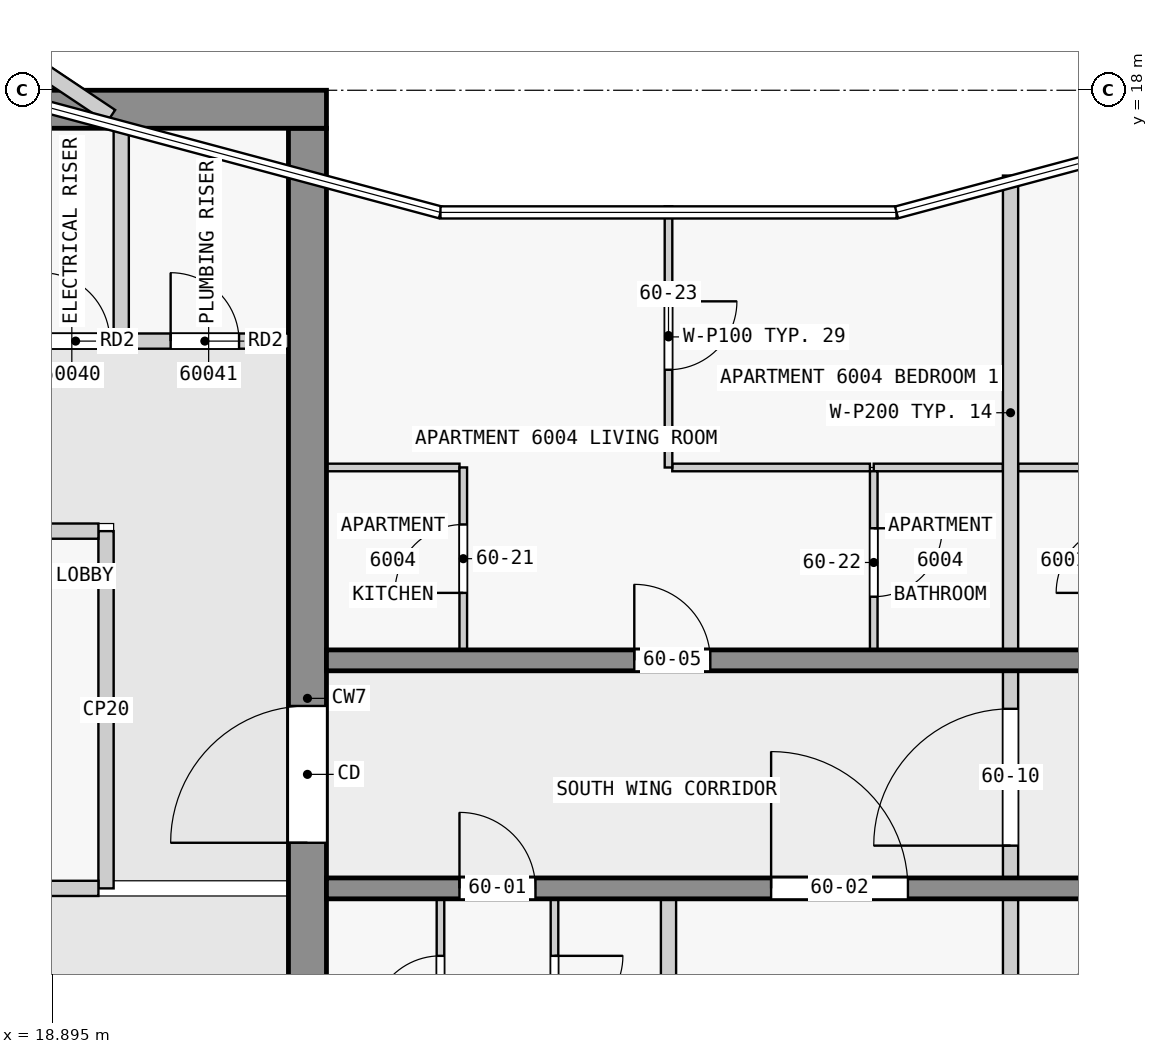
"""IFC4 building model, lengths in metres.
Left out: names, types, materials, properties, quantities, classifications, styles, units other than length and angle.
Written with IfcOpenShell. Run it as: python <this file> out.ifc"""

import sys

from ifc_helpers import new_model, si_unit, direction, frame, frame_2d, origin, place, context, subcontext, project, spatial, rectangle, extrude, element, fill, save


model = new_model("IFC4")
c1 = context("Model", 3, precision=1e-05, world=origin(), true_north=direction((0.0, 1.0)))
c2 = subcontext(c1, "Body", "Model", "MODEL_VIEW")
j1 = project(units=[si_unit("LENGTHUNIT", "METRE"), si_unit("PLANEANGLEUNIT", "RADIAN")], contexts=[c1])
p1 = place(None, origin())
s1 = spatial("IfcSite", under=j1, at=p1, CompositionType="ELEMENT")
p2 = place(p1, origin())
s2 = spatial("IfcBuilding", under=s1, at=p2, CompositionType="ELEMENT")
p3 = place(p2, frame((0.0, 0.0, 229.4)))
s3 = spatial("IfcBuildingStorey", under=s2, at=p3, CompositionType="ELEMENT", Elevation=229.4)
p4 = place(p3, frame((1.8, 17.75, 0.0), z_axis=(0.0, 0.0, 1.0), x_axis=(1.0, 0.0, 0.0)))
e1 = element("IfcWall", 1, at=p4, inside=s3, PredefinedType="SHEAR", context=c2, shape_type="SweptSolid", body=[
    extrude(rectangle(XDim=20.7, YDim=0.5, at=frame_2d((10.35, 0.0))), origin(), (0.0, 0.0, 1.0), 3.25),
])
p5 = place(p3, frame((22.25, 2.5, 0.0), z_axis=(0.0, 0.0, 1.0), x_axis=(0.0, 1.0, 0.0)))
e2 = element("IfcWall", 2, at=p5, inside=s3, PredefinedType="SHEAR", context=c2, shape_type="SweptSolid", body=[
    extrude(rectangle(XDim=15.0, YDim=0.5, at=frame_2d((7.5, 0.0))), origin(), (0.0, 0.0, 1.0), 3.25),
])
p6 = place(p5, frame((5.6, 0.0, 0.0)))
e3 = element("IfcOpeningElement", 3, at=p6, cuts=e2, PredefinedType="OPENING", context=c2, shape_type="SweptSolid", body=[
    extrude(rectangle(XDim=1.8, YDim=2.1, at=frame_2d((0.9, 1.05))), frame((0.0, 0.26, 0.0), z_axis=(0.0, -1.0, 0.0), x_axis=(1.0, 0.0, 0.0)), (0.0, 0.0, 1.0), 0.52),
])
p7 = place(p3, frame((22.5, 7.5, 0.0), z_axis=(0.0, 0.0, 1.0), x_axis=(1.0, 0.0, 0.0)))
e4 = element("IfcWall", 4, at=p7, inside=s3, PredefinedType="SHEAR", context=c2, shape_type="SweptSolid", body=[
    extrude(rectangle(XDim=22.5, YDim=0.275, at=frame_2d((11.25, 0.0))), origin(), (0.0, 0.0, 1.0), 3.25),
])
p8 = place(p7, frame((1.75, 0.0, 0.0)))
e5 = element("IfcOpeningElement", 5, at=p8, cuts=e4, PredefinedType="OPENING", context=c2, shape_type="SweptSolid", body=[
    extrude(rectangle(XDim=1.0, YDim=2.1, at=frame_2d((0.5, 1.05))), frame((0.0, 0.147, 0.0), z_axis=(0.0, -1.0, 0.0), x_axis=(1.0, 0.0, 0.0)), (0.0, 0.0, 1.0), 0.295),
])
p9 = place(p7, frame((5.85, 0.0, 0.0)))
e6 = element("IfcOpeningElement", 6, at=p9, cuts=e4, PredefinedType="OPENING", context=c2, shape_type="SweptSolid", body=[
    extrude(rectangle(XDim=1.8, YDim=2.1, at=frame_2d((0.9, 1.05))), frame((0.0, 0.147, 0.0), z_axis=(0.0, -1.0, 0.0), x_axis=(1.0, 0.0, 0.0)), (0.0, 0.0, 1.0), 0.295),
])
p10 = place(p7, frame((10.75, 0.0, 0.0)))
e7 = element("IfcOpeningElement", 7, at=p10, cuts=e4, PredefinedType="OPENING", context=c2, shape_type="SweptSolid", body=[
    extrude(rectangle(XDim=1.0, YDim=2.1, at=frame_2d((0.5, 1.05))), frame((0.0, 0.147, 0.0), z_axis=(0.0, -1.0, 0.0), x_axis=(1.0, 0.0, 0.0)), (0.0, 0.0, 1.0), 0.295),
])
p11 = place(p7, frame((16.85, 0.0, 0.0)))
e8 = element("IfcOpeningElement", 8, at=p11, cuts=e4, PredefinedType="OPENING", context=c2, shape_type="SweptSolid", body=[
    extrude(rectangle(XDim=1.0, YDim=2.1, at=frame_2d((0.5, 1.05))), frame((0.0, 0.147, 0.0), z_axis=(0.0, -1.0, 0.0), x_axis=(1.0, 0.0, 0.0)), (0.0, 0.0, 1.0), 0.295),
])
p12 = place(p3, frame((22.5, 10.5, 0.0), z_axis=(0.0, 0.0, 1.0), x_axis=(1.0, 0.0, 0.0)))
e9 = element("IfcWall", 9, at=p12, inside=s3, PredefinedType="SHEAR", context=c2, shape_type="SweptSolid", body=[
    extrude(rectangle(XDim=22.5, YDim=0.275, at=frame_2d((11.25, 0.0))), origin(), (0.0, 0.0, 1.0), 3.25),
])
p13 = place(p12, frame((4.05, 0.0, 0.0)))
e10 = element("IfcOpeningElement", 10, at=p13, cuts=e9, PredefinedType="OPENING", context=c2, shape_type="SweptSolid", body=[
    extrude(rectangle(XDim=1.0, YDim=2.1, at=frame_2d((0.5, 1.05))), frame((0.0, 0.147, 0.0), z_axis=(0.0, -1.0, 0.0), x_axis=(1.0, 0.0, 0.0)), (0.0, 0.0, 1.0), 0.295),
])
p14 = place(p12, frame((10.75, 0.0, 0.0)))
e11 = element("IfcOpeningElement", 11, at=p14, cuts=e9, PredefinedType="OPENING", context=c2, shape_type="SweptSolid", body=[
    extrude(rectangle(XDim=1.0, YDim=2.1, at=frame_2d((0.5, 1.05))), frame((0.0, 0.147, 0.0), z_axis=(0.0, -1.0, 0.0), x_axis=(1.0, 0.0, 0.0)), (0.0, 0.0, 1.0), 0.295),
])
p15 = place(p12, frame((15.25, 0.0, 0.0)))
e12 = element("IfcOpeningElement", 12, at=p15, cuts=e9, PredefinedType="OPENING", context=c2, shape_type="SweptSolid", body=[
    extrude(rectangle(XDim=1.0, YDim=2.1, at=frame_2d((0.5, 1.05))), frame((0.0, 0.147, 0.0), z_axis=(0.0, -1.0, 0.0), x_axis=(1.0, 0.0, 0.0)), (0.0, 0.0, 1.0), 0.295),
])
p16 = place(p12, frame((18.75, 0.0, 0.0)))
e13 = element("IfcOpeningElement", 13, at=p16, cuts=e9, PredefinedType="OPENING", context=c2, shape_type="SweptSolid", body=[
    extrude(rectangle(XDim=0.9, YDim=2.1, at=frame_2d((0.45, 1.05))), frame((0.0, 0.147, 0.0), z_axis=(0.0, -1.0, 0.0), x_axis=(1.0, 0.0, 0.0)), (0.0, 0.0, 1.0), 0.295),
])
p17 = place(p12, frame((20.95, 0.0, 0.0)))
e14 = element("IfcOpeningElement", 14, at=p17, cuts=e9, PredefinedType="OPENING", context=c2, shape_type="SweptSolid", body=[
    extrude(rectangle(XDim=1.0, YDim=2.1, at=frame_2d((0.5, 1.05))), frame((0.0, 0.147, 0.0), z_axis=(0.0, -1.0, 0.0), x_axis=(1.0, 0.0, 0.0)), (0.0, 0.0, 1.0), 0.295),
])
p18 = place(p3, frame((18.619, 18.356, 0.0), z_axis=(0.0, 0.0, 1.0), x_axis=(0.831571950254, -0.555417042907, 0.0)))
e15 = element("IfcWall", 15, at=p18, inside=s3, PredefinedType="PARAPET", context=c2, shape_type="SweptSolid", body=[
    extrude(rectangle(XDim=1.257, YDim=0.2, at=frame_2d((0.628, 0.0))), origin(), (0.0, 0.0, 1.0), 1.0),
])
p19 = place(p3, frame((10.9, 7.5, 0.0), z_axis=(0.0, 0.0, 1.0), x_axis=(1.0, 0.0, 0.0)))
e16 = element("IfcWall", 16, at=p19, inside=s3, PredefinedType="PARTITIONING", context=c2, shape_type="SweptSolid", body=[
    extrude(rectangle(XDim=8.6, YDim=0.2, at=frame_2d((4.3, 0.0))), origin(), (0.0, 0.0, 1.0), 3.25),
])
p20 = place(p3, frame((19.6, 7.5, 0.0), z_axis=(0.0, 0.0, 1.0), x_axis=(0.0, 1.0, 0.0)))
e17 = element("IfcWall", 17, at=p20, inside=s3, PredefinedType="PARTITIONING", context=c2, shape_type="SweptSolid", body=[
    extrude(rectangle(XDim=4.7, YDim=0.2, at=frame_2d((2.35, 0.0))), origin(), (0.0, 0.0, 1.0), 3.25),
])
p21 = place(p3, frame((10.9, 12.2, 0.0), z_axis=(0.0, 0.0, 1.0), x_axis=(1.0, 0.0, 0.0)))
e18 = element("IfcWall", 18, at=p21, inside=s3, PredefinedType="PARTITIONING", context=c2, shape_type="SweptSolid", body=[
    extrude(rectangle(XDim=8.6, YDim=0.2, at=frame_2d((4.3, 0.0))), origin(), (0.0, 0.0, 1.0), 3.25),
])
p22 = place(p21, frame((1.425, 0.0, 0.0)))
e19 = element("IfcOpeningElement", 19, at=p22, cuts=e18, PredefinedType="OPENING", context=c2, shape_type="SweptSolid", body=[
    extrude(rectangle(XDim=0.9, YDim=2.1, at=frame_2d((0.45, 1.05))), frame((0.0, 0.11, 0.0), z_axis=(0.0, -1.0, 0.0), x_axis=(1.0, 0.0, 0.0)), (0.0, 0.0, 1.0), 0.22),
])
p23 = place(p21, frame((5.825, 0.0, 0.0)))
e20 = element("IfcOpeningElement", 20, at=p23, cuts=e18, PredefinedType="OPENING", context=c2, shape_type="SweptSolid", body=[
    extrude(rectangle(XDim=0.9, YDim=2.1, at=frame_2d((0.45, 1.05))), frame((0.0, 0.11, 0.0), z_axis=(0.0, -1.0, 0.0), x_axis=(1.0, 0.0, 0.0)), (0.0, 0.0, 1.0), 0.22),
])
p24 = place(p3, frame((18.6, 14.7, 0.0), z_axis=(0.0, 0.0, 1.0), x_axis=(1.0, 0.0, 0.0)))
e21 = element("IfcWall", 21, at=p24, inside=s3, PredefinedType="PARTITIONING", context=c2, shape_type="SweptSolid", body=[
    extrude(rectangle(XDim=3.4, YDim=0.2, at=frame_2d((1.7, 0.0))), origin(), (0.0, 0.0, 1.0), 3.25),
])
p25 = place(p24, frame((0.15, 0.0, 0.0)))
e22 = element("IfcOpeningElement", 22, at=p25, cuts=e21, PredefinedType="OPENING", context=c2, shape_type="SweptSolid", body=[
    extrude(rectangle(XDim=0.9, YDim=2.1, at=frame_2d((0.45, 1.05))), frame((0.0, 0.11, 0.0), z_axis=(0.0, -1.0, 0.0), x_axis=(1.0, 0.0, 0.0)), (0.0, 0.0, 1.0), 0.22),
])
p26 = place(p24, frame((1.85, 0.0, 0.0)))
e23 = element("IfcOpeningElement", 23, at=p26, cuts=e21, PredefinedType="OPENING", context=c2, shape_type="SweptSolid", body=[
    extrude(rectangle(XDim=0.9, YDim=2.1, at=frame_2d((0.45, 1.05))), frame((0.0, 0.11, 0.0), z_axis=(0.0, -1.0, 0.0), x_axis=(1.0, 0.0, 0.0)), (0.0, 0.0, 1.0), 0.22),
])
p27 = place(p3, frame((19.8, 14.8, 0.0), z_axis=(0.0, 0.0, 1.0), x_axis=(0.0, 1.0, 0.0)))
e24 = element("IfcWall", 24, at=p27, inside=s3, PredefinedType="PARTITIONING", context=c2, shape_type="SweptSolid", body=[
    extrude(rectangle(XDim=2.7, YDim=0.2, at=frame_2d((1.35, 0.0))), origin(), (0.0, 0.0, 1.0), 3.25),
])
p28 = place(p3, frame((24.25, 13.038, 0.0), z_axis=(0.0, 0.0, 1.0), x_axis=(-1.0, 0.0, 0.0)))
e25 = element("IfcWall", 25, at=p28, inside=s3, PredefinedType="PARTITIONING", context=c2, shape_type="SweptSolid", body=[
    extrude(rectangle(XDim=1.75, YDim=0.1, at=frame_2d((0.875, 0.0))), origin(), (0.0, 0.0, 1.0), 3.25),
])
p29 = place(p3, frame((31.4, 13.038, 0.0), z_axis=(0.0, 0.0, 1.0), x_axis=(-1.0, 0.0, 0.0)))
e26 = element("IfcWall", 26, at=p29, inside=s3, PredefinedType="PARTITIONING", context=c2, shape_type="SweptSolid", body=[
    extrude(rectangle(XDim=1.7, YDim=0.1, at=frame_2d((0.85, 0.0))), origin(), (0.0, 0.0, 1.0), 3.25),
])
p30 = place(p3, frame((33.0, 13.038, 0.0), z_axis=(0.0, 0.0, 1.0), x_axis=(-1.0, 0.0, 0.0)))
e27 = element("IfcWall", 27, at=p30, inside=s3, PredefinedType="PARTITIONING", context=c2, shape_type="SweptSolid", body=[
    extrude(rectangle(XDim=1.4, YDim=0.1, at=frame_2d((0.7, 0.0))), origin(), (0.0, 0.0, 1.0), 3.25),
])
p31 = place(p3, frame((27.05, 13.038, 0.0), z_axis=(0.0, 0.0, 1.0), x_axis=(1.0, 0.0, 0.0)))
e28 = element("IfcWall", 28, at=p31, inside=s3, PredefinedType="PARTITIONING", context=c2, shape_type="SweptSolid", body=[
    extrude(rectangle(XDim=2.6, YDim=0.1, at=frame_2d((1.3, 0.0))), origin(), (0.0, 0.0, 1.0), 3.25),
])
p32 = place(p3, frame((24.0, 4.962, 0.0), z_axis=(0.0, 0.0, 1.0), x_axis=(0.0, 1.0, 0.0)))
e29 = element("IfcWall", 29, at=p32, inside=s3, PredefinedType="PARTITIONING", context=c2, shape_type="SweptSolid", body=[
    extrude(rectangle(XDim=2.4, YDim=0.1, at=frame_2d((1.2, 0.0))), origin(), (0.0, 0.0, 1.0), 3.25),
])
p33 = place(p32, frame((0.75, 0.0, 0.0)))
e30 = element("IfcOpeningElement", 30, at=p33, cuts=e29, PredefinedType="OPENING", context=c2, shape_type="SweptSolid", body=[
    extrude(rectangle(XDim=0.9, YDim=2.1, at=frame_2d((0.45, 1.05))), frame((0.0, 0.06, 0.0), z_axis=(0.0, -1.0, 0.0), x_axis=(1.0, 0.0, 0.0)), (0.0, 0.0, 1.0), 0.12),
])
p34 = place(p3, frame((24.3, 10.637, 0.0), z_axis=(0.0, 0.0, 1.0), x_axis=(0.0, 1.0, 0.0)))
e31 = element("IfcWall", 31, at=p34, inside=s3, PredefinedType="PARTITIONING", context=c2, shape_type="SweptSolid", body=[
    extrude(rectangle(XDim=2.4, YDim=0.1, at=frame_2d((1.2, 0.0))), origin(), (0.0, 0.0, 1.0), 3.25),
])
p35 = place(p34, frame((0.75, 0.0, 0.0)))
e32 = element("IfcOpeningElement", 32, at=p35, cuts=e31, PredefinedType="OPENING", context=c2, shape_type="SweptSolid", body=[
    extrude(rectangle(XDim=0.9, YDim=2.1, at=frame_2d((0.45, 1.05))), frame((0.0, 0.06, 0.0), z_axis=(0.0, -1.0, 0.0), x_axis=(1.0, 0.0, 0.0)), (0.0, 0.0, 1.0), 0.12),
])
p36 = place(p3, frame((25.5, 7.363, 0.0), z_axis=(0.0, 0.0, 1.0), x_axis=(0.0, -1.0, 0.0)))
e33 = element("IfcWall", 33, at=p36, inside=s3, PredefinedType="PARTITIONING", context=c2, shape_type="SweptSolid", body=[
    extrude(rectangle(XDim=2.4, YDim=0.1, at=frame_2d((1.2, 0.0))), origin(), (0.0, 0.0, 1.0), 3.25),
])
p37 = place(p36, frame((0.75, 0.0, 0.0)))
e34 = element("IfcOpeningElement", 34, at=p37, cuts=e33, PredefinedType="OPENING", context=c2, shape_type="SweptSolid", body=[
    extrude(rectangle(XDim=0.9, YDim=2.1, at=frame_2d((0.45, 1.05))), frame((0.0, 0.06, 0.0), z_axis=(0.0, -1.0, 0.0), x_axis=(1.0, 0.0, 0.0)), (0.0, 0.0, 1.0), 0.12),
])
p38 = place(p3, frame((27.0, 16.473, 0.0), z_axis=(0.0, 0.0, 1.0), x_axis=(0.0, -1.0, 0.0)))
e35 = element("IfcWall", 35, at=p38, inside=s3, PredefinedType="PARTITIONING", context=c2, shape_type="SweptSolid", body=[
    extrude(rectangle(XDim=3.436, YDim=0.1, at=frame_2d((1.718, 0.0))), origin(), (0.0, 0.0, 1.0), 3.25),
])
p39 = place(p38, frame((1.25, 0.0, 0.0)))
e36 = element("IfcOpeningElement", 36, at=p39, cuts=e35, PredefinedType="OPENING", context=c2, shape_type="SweptSolid", body=[
    extrude(rectangle(XDim=0.9, YDim=2.1, at=frame_2d((0.45, 1.05))), frame((0.0, 0.06, 0.0), z_axis=(0.0, -1.0, 0.0), x_axis=(1.0, 0.0, 0.0)), (0.0, 0.0, 1.0), 0.12),
])
p40 = place(p3, frame((27.0, 5.062, 0.0), z_axis=(0.0, 0.0, 1.0), x_axis=(0.0, 1.0, 0.0)))
e37 = element("IfcWall", 37, at=p40, inside=s3, PredefinedType="PARTITIONING", context=c2, shape_type="SweptSolid", body=[
    extrude(rectangle(XDim=2.3, YDim=0.2, at=frame_2d((1.15, 0.0))), origin(), (0.0, 0.0, 1.0), 3.25),
])
p41 = place(p3, frame((29.7, 12.988, 0.0), z_axis=(0.0, 0.0, 1.0), x_axis=(0.0, -1.0, 0.0)))
e38 = element("IfcWall", 38, at=p41, inside=s3, PredefinedType="PARTITIONING", context=c2, shape_type="SweptSolid", body=[
    extrude(rectangle(XDim=2.35, YDim=0.1, at=frame_2d((1.175, 0.0))), origin(), (0.0, 0.0, 1.0), 3.25),
])
p42 = place(p41, frame((0.75, 0.0, 0.0)))
e39 = element("IfcOpeningElement", 39, at=p42, cuts=e38, PredefinedType="OPENING", context=c2, shape_type="SweptSolid", body=[
    extrude(rectangle(XDim=0.9, YDim=2.1, at=frame_2d((0.45, 1.05))), frame((0.0, 0.06, 0.0), z_axis=(0.0, -1.0, 0.0), x_axis=(1.0, 0.0, 0.0)), (0.0, 0.0, 1.0), 0.12),
])
for number, where, z_axis, x_axis in (
    (40, (31.5, 1.122, 0.0), (0.0, 0.0, 1.0), (0.0, 1.0, 0.0)),
    (41, (31.5, 10.637, 0.0), (0.0, 0.0, 1.0), (0.0, 1.0, 0.0)),
):
    element("IfcWall", number, at=place(p3, frame(where, z_axis=z_axis, x_axis=x_axis)), inside=s3, PredefinedType="PARTITIONING", context=c2, shape_type="SweptSolid", body=[
        extrude(rectangle(XDim=6.24, YDim=0.2, at=frame_2d((3.12, 0.0))), origin(), (0.0, 0.0, 1.0), 3.25),
    ])
p43 = place(p3, frame((31.5, 7.462, 0.0), z_axis=(0.0, 0.0, 1.0), x_axis=(0.0, 1.0, 0.0)))
e42 = element("IfcWall", 42, at=p43, inside=s3, PredefinedType="PARTITIONING", context=c2, shape_type="SweptSolid", body=[
    extrude(rectangle(XDim=3.075, YDim=0.2, at=frame_2d((1.538, 0.0))), origin(), (0.0, 0.0, 1.0), 3.25),
])
p44 = place(p43, frame((0.6, 0.0, 0.0)))
e43 = element("IfcOpeningElement", 43, at=p44, cuts=e42, PredefinedType="OPENING", context=c2, shape_type="SweptSolid", body=[
    extrude(rectangle(XDim=1.8, YDim=2.1, at=frame_2d((0.9, 1.05))), frame((0.0, 0.11, 0.0), z_axis=(0.0, -1.0, 0.0), x_axis=(1.0, 0.0, 0.0)), (0.0, 0.0, 1.0), 0.22),
])
p45 = place(p6, origin())
e44 = element("IfcDoor", 44, at=p45, inside=s3, OperationType="DOUBLE_DOOR_SINGLE_SWING", PredefinedType="DOOR", context=c2, shape_type="SweptSolid", body=[
    extrude(rectangle(XDim=1.8, YDim=2.1, at=frame_2d((0.9, 1.05))), frame((0.0, 0.025, 0.0), z_axis=(0.0, -1.0, 0.0), x_axis=(1.0, 0.0, 0.0)), (0.0, 0.0, 1.0), 0.05),
])
fill(e3, e44)
p46 = place(p25, origin())
e45 = element("IfcDoor", 45, at=p46, inside=s3, OperationType="SINGLE_SWING_LEFT", PredefinedType="DOOR", context=c2, shape_type="SweptSolid", body=[
    extrude(rectangle(XDim=0.9, YDim=2.1, at=frame_2d((0.45, 1.05))), frame((0.0, 0.025, 0.0), z_axis=(0.0, -1.0, 0.0), x_axis=(1.0, 0.0, 0.0)), (0.0, 0.0, 1.0), 0.05),
])
fill(e22, e45)
p47 = place(p26, origin())
e46 = element("IfcDoor", 46, at=p47, inside=s3, OperationType="SINGLE_SWING_LEFT", PredefinedType="DOOR", context=c2, shape_type="SweptSolid", body=[
    extrude(rectangle(XDim=0.9, YDim=2.1, at=frame_2d((0.45, 1.05))), frame((0.0, 0.025, 0.0), z_axis=(0.0, -1.0, 0.0), x_axis=(1.0, 0.0, 0.0)), (0.0, 0.0, 1.0), 0.05),
])
fill(e23, e46)
p48 = place(p8, origin())
e47 = element("IfcDoor", 47, at=p48, inside=s3, OperationType="SINGLE_SWING_LEFT", PredefinedType="DOOR", context=c2, shape_type="SweptSolid", body=[
    extrude(rectangle(XDim=1.0, YDim=2.1, at=frame_2d((0.5, 1.05))), frame((0.0, 0.025, 0.0), z_axis=(0.0, -1.0, 0.0), x_axis=(1.0, 0.0, 0.0)), (0.0, 0.0, 1.0), 0.05),
])
fill(e5, e47)
p49 = place(p9, origin())
e48 = element("IfcDoor", 48, at=p49, inside=s3, OperationType="SINGLE_SWING_LEFT", PredefinedType="DOOR", context=c2, shape_type="SweptSolid", body=[
    extrude(rectangle(XDim=1.8, YDim=2.1, at=frame_2d((0.9, 1.05))), frame((0.0, 0.025, 0.0), z_axis=(0.0, -1.0, 0.0), x_axis=(1.0, 0.0, 0.0)), (0.0, 0.0, 1.0), 0.05),
])
fill(e6, e48)
p50 = place(p13, origin())
e49 = element("IfcDoor", 49, at=p50, inside=s3, OperationType="SINGLE_SWING_LEFT", PredefinedType="DOOR", context=c2, shape_type="SweptSolid", body=[
    extrude(rectangle(XDim=1.0, YDim=2.1, at=frame_2d((0.5, 1.05))), frame((0.0, 0.025, 0.0), z_axis=(0.0, -1.0, 0.0), x_axis=(1.0, 0.0, 0.0)), (0.0, 0.0, 1.0), 0.05),
])
fill(e10, e49)
p51 = place(p44, origin())
e50 = element("IfcDoor", 50, at=p51, inside=s3, OperationType="SINGLE_SWING_LEFT", PredefinedType="DOOR", context=c2, shape_type="SweptSolid", body=[
    extrude(rectangle(XDim=1.8, YDim=2.1, at=frame_2d((0.9, 1.05))), frame((0.0, 0.025, 0.0), z_axis=(0.0, -1.0, 0.0), x_axis=(1.0, 0.0, 0.0)), (0.0, 0.0, 1.0), 0.05),
])
fill(e43, e50)
p52 = place(p33, origin())
e51 = element("IfcDoor", 51, at=p52, inside=s3, OperationType="SINGLE_SWING_RIGHT", PredefinedType="DOOR", context=c2, shape_type="SweptSolid", body=[
    extrude(rectangle(XDim=0.9, YDim=2.1, at=frame_2d((0.45, 1.05))), frame((0.0, 0.025, 0.0), z_axis=(0.0, -1.0, 0.0), x_axis=(1.0, 0.0, 0.0)), (0.0, 0.0, 1.0), 0.05),
])
fill(e30, e51)
p53 = place(p37, origin())
e52 = element("IfcDoor", 52, at=p53, inside=s3, OperationType="SINGLE_SWING_RIGHT", PredefinedType="DOOR", context=c2, shape_type="SweptSolid", body=[
    extrude(rectangle(XDim=0.9, YDim=2.1, at=frame_2d((0.45, 1.05))), frame((0.0, 0.025, 0.0), z_axis=(0.0, -1.0, 0.0), x_axis=(1.0, 0.0, 0.0)), (0.0, 0.0, 1.0), 0.05),
])
fill(e34, e52)
p54 = place(p35, origin())
e53 = element("IfcDoor", 53, at=p54, inside=s3, OperationType="SINGLE_SWING_LEFT", PredefinedType="DOOR", context=c2, shape_type="SweptSolid", body=[
    extrude(rectangle(XDim=0.9, YDim=2.1, at=frame_2d((0.45, 1.05))), frame((0.0, 0.025, 0.0), z_axis=(0.0, -1.0, 0.0), x_axis=(1.0, 0.0, 0.0)), (0.0, 0.0, 1.0), 0.05),
])
fill(e32, e53)
p55 = place(p42, origin())
e54 = element("IfcDoor", 54, at=p55, inside=s3, OperationType="SINGLE_SWING_RIGHT", PredefinedType="DOOR", context=c2, shape_type="SweptSolid", body=[
    extrude(rectangle(XDim=0.9, YDim=2.1, at=frame_2d((0.45, 1.05))), frame((0.0, 0.025, 0.0), z_axis=(0.0, -1.0, 0.0), x_axis=(1.0, 0.0, 0.0)), (0.0, 0.0, 1.0), 0.05),
])
fill(e39, e54)
p56 = place(p39, origin())
e55 = element("IfcDoor", 55, at=p56, inside=s3, OperationType="SINGLE_SWING_LEFT", PredefinedType="DOOR", context=c2, shape_type="SweptSolid", body=[
    extrude(rectangle(XDim=0.9, YDim=2.1, at=frame_2d((0.45, 1.05))), frame((0.0, 0.025, 0.0), z_axis=(0.0, -1.0, 0.0), x_axis=(1.0, 0.0, 0.0)), (0.0, 0.0, 1.0), 0.05),
])
fill(e36, e55)
save(model, sys.argv[1])
